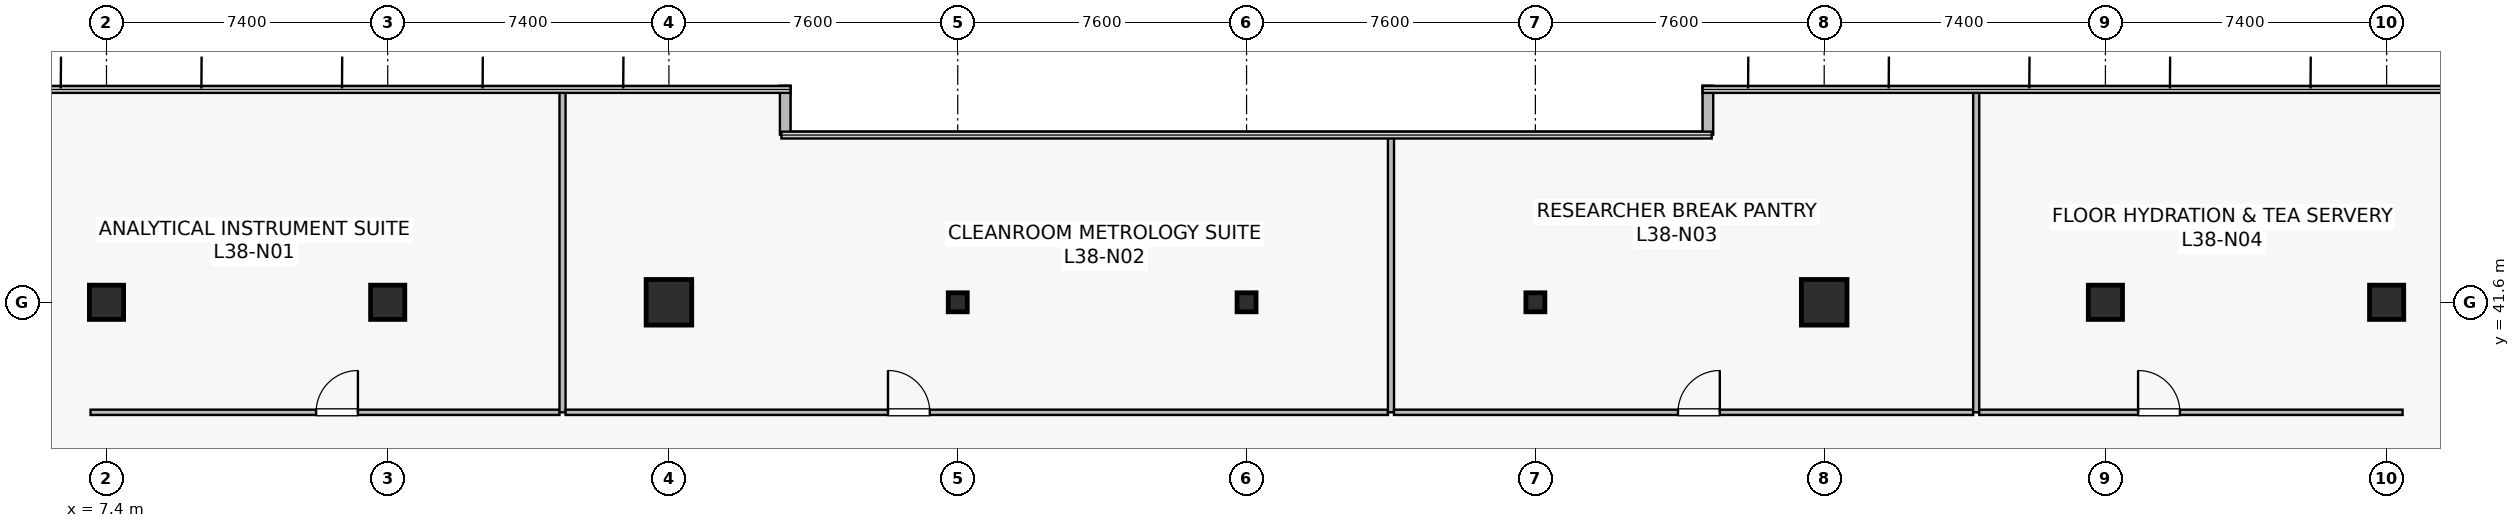
"""IFC4 building model, lengths in metres.
Left out: names, types, materials, properties, quantities, classifications, styles, units other than length and angle.
Written with IfcOpenShell. Run it as: python <this file> out.ifc"""

import sys

from ifc_helpers import new_model, si_unit, direction, frame, frame_2d, origin, origin_2d, place, context, subcontext, project, spatial, rectangle, hollow_rectangle, extrude, source, transform, mapped, element, fill, save


model = new_model("IFC4")
c1 = context("Model", 3, precision=1e-05, world=origin(), true_north=direction((0.0, 1.0)))
c2 = subcontext(c1, "Body", "Model", "MODEL_VIEW")
j1 = project(units=[si_unit("LENGTHUNIT", "METRE"), si_unit("PLANEANGLEUNIT", "RADIAN")], contexts=[c1])
p1 = place(None, origin())
s1 = spatial("IfcSite", under=j1, at=p1, CompositionType="ELEMENT")
p2 = place(p1, origin())
s2 = spatial("IfcBuilding", under=s1, at=p2, CompositionType="ELEMENT")
p3 = place(p2, frame((0.0, 0.0, 158.4)))
s3 = spatial("IfcBuildingStorey", under=s2, at=p3, CompositionType="ELEMENT", Elevation=158.4)
m1 = source(origin(), c2, "Body", "SweptSolid", [
    extrude(rectangle(XDim=0.9, YDim=0.9, at=origin_2d()), origin(), (0.0, 0.0, 1.0), 4.1),
])
p4 = place(p3, frame((14.8, 41.6, 0.0), z_axis=(0.0, 0.0, 1.0), x_axis=(1.0, 0.0, 0.0)))
e1 = element("IfcColumn", 1, at=p4, inside=s3, PredefinedType="COLUMN", context=c2, shape_type="MappedRepresentation", body=[
    mapped(m1, transform((0.0, 0.0, 0.0), scale=1.0)),
])
m2 = source(origin(), c2, "Body", "SweptSolid", [
    extrude(rectangle(XDim=1.2, YDim=1.2, at=origin_2d()), origin(), (0.0, 0.0, 1.0), 4.1),
])
for number, where, z_axis, x_axis in (
    (2, (22.2, 41.6, 0.0), (0.0, 0.0, 1.0), (1.0, 0.0, 0.0)),
    (3, (52.6, 41.6, 0.0), (0.0, 0.0, 1.0), (1.0, 0.0, 0.0)),
):
    element("IfcColumn", number, at=place(p3, frame(where, z_axis=z_axis, x_axis=x_axis)), inside=s3, PredefinedType="COLUMN", context=c2, shape_type="MappedRepresentation", body=[
        mapped(m2, transform((0.0, 0.0, 0.0), scale=1.0)),
    ])
for number, where, z_axis, x_axis in (
    (4, (60.0, 41.6, 0.0), (0.0, 0.0, 1.0), (1.0, 0.0, 0.0)),
    (5, (7.4, 41.6, 0.0), (0.0, 0.0, 1.0), (1.0, 0.0, 0.0)),
    (6, (67.4, 41.6, 0.0), (0.0, 0.0, 1.0), (1.0, 0.0, 0.0)),
):
    element("IfcColumn", number, at=place(p3, frame(where, z_axis=z_axis, x_axis=x_axis)), inside=s3, PredefinedType="COLUMN", context=c2, shape_type="MappedRepresentation", body=[
        mapped(m1, transform((0.0, 0.0, 0.0), scale=1.0)),
    ])
m3 = source(origin(), c2, "Body", "SweptSolid", [
    extrude(hollow_rectangle(XDim=0.5, YDim=0.5, WallThickness=0.022, at=origin_2d()), origin(), (0.0, 0.0, 1.0), 4.1),
])
for number, where, z_axis, x_axis in (
    (7, (29.8, 41.6, 0.0), (0.0, 0.0, 1.0), (1.0, 0.0, 0.0)),
    (8, (37.4, 41.6, 0.0), (0.0, 0.0, 1.0), (1.0, 0.0, 0.0)),
    (9, (45.0, 41.6, 0.0), (0.0, 0.0, 1.0), (1.0, 0.0, 0.0)),
):
    element("IfcColumn", number, at=place(p3, frame(where, z_axis=z_axis, x_axis=x_axis)), inside=s3, PredefinedType="COLUMN", context=c2, shape_type="MappedRepresentation", body=[
        mapped(m3, transform((0.0, 0.0, 0.0), scale=1.0)),
    ])
for number, where, z_axis, x_axis in (
    (10, (49.54, 47.3, 0.0), (0.0, 0.0, 1.0), (0.0, -1.0, 0.0)),
    (11, (25.26, 46.012, 0.0), (0.0, 0.0, 1.0), (0.0, 1.0, 0.0)),
):
    element("IfcWall", number, at=place(p3, frame(where, z_axis=z_axis, x_axis=x_axis)), inside=s3, PredefinedType="STANDARD", context=c2, shape_type="SweptSolid", body=[
        extrude(rectangle(XDim=1.288, YDim=0.28, at=frame_2d((0.644, 0.0))), origin(), (0.0, 0.0, 1.0), 3.79),
    ])
p5 = place(p3, frame((6.98, 38.705, 0.0), z_axis=(0.0, 0.0, 1.0), x_axis=(1.0, 0.0, 0.0)))
e12 = element("IfcWall", 12, at=p5, inside=s3, PredefinedType="PARTITIONING", context=c2, shape_type="SweptSolid", body=[
    extrude(rectangle(XDim=12.34, YDim=0.14, at=frame_2d((6.17, 0.0))), origin(), (0.0, 0.0, 1.0), 3.187),
])
p6 = place(p5, frame((5.936, 0.0, 0.0)))
e13 = element("IfcOpeningElement", 13, at=p6, cuts=e12, PredefinedType="OPENING", context=c2, shape_type="SweptSolid", body=[
    extrude(rectangle(XDim=1.1, YDim=2.18, at=frame_2d((0.55, 1.09))), frame((0.0, 0.08, 0.0), z_axis=(0.0, -1.0, 0.0), x_axis=(1.0, 0.0, 0.0)), (0.0, 0.0, 1.0), 0.16),
])
p7 = place(p3, frame((19.4, 38.705, 0.0), z_axis=(0.0, 0.0, 1.0), x_axis=(0.0, 1.0, 0.0)))
e14 = element("IfcWall", 14, at=p7, inside=s3, PredefinedType="PARTITIONING", context=c2, shape_type="SweptSolid", body=[
    extrude(rectangle(XDim=8.485, YDim=0.16, at=frame_2d((4.242, 0.0))), origin(), (0.0, 0.0, 1.0), 3.075),
])
p8 = place(p3, frame((19.48, 38.705, 0.0), z_axis=(0.0, 0.0, 1.0), x_axis=(1.0, 0.0, 0.0)))
e15 = element("IfcWall", 15, at=p8, inside=s3, PredefinedType="PARTITIONING", context=c2, shape_type="SweptSolid", body=[
    extrude(rectangle(XDim=21.64, YDim=0.14, at=frame_2d((10.82, 0.0))), origin(), (0.0, 0.0, 1.0), 3.187),
])
p9 = place(p8, frame((8.484, 0.0, 0.0)))
e16 = element("IfcOpeningElement", 16, at=p9, cuts=e15, PredefinedType="OPENING", context=c2, shape_type="SweptSolid", body=[
    extrude(rectangle(XDim=1.1, YDim=2.18, at=frame_2d((0.55, 1.09))), frame((0.0, 0.08, 0.0), z_axis=(0.0, -1.0, 0.0), x_axis=(1.0, 0.0, 0.0)), (0.0, 0.0, 1.0), 0.16),
])
p10 = place(p3, frame((41.2, 38.705, 0.0), z_axis=(0.0, 0.0, 1.0), x_axis=(0.0, 1.0, 0.0)))
e17 = element("IfcWall", 17, at=p10, inside=s3, PredefinedType="PARTITIONING", context=c2, shape_type="SweptSolid", body=[
    extrude(rectangle(XDim=7.285, YDim=0.16, at=frame_2d((3.643, 0.0))), origin(), (0.0, 0.0, 1.0), 3.075),
])
p11 = place(p3, frame((41.28, 38.705, 0.0), z_axis=(0.0, 0.0, 1.0), x_axis=(1.0, 0.0, 0.0)))
e18 = element("IfcWall", 18, at=p11, inside=s3, PredefinedType="PARTITIONING", context=c2, shape_type="SweptSolid", body=[
    extrude(rectangle(XDim=15.24, YDim=0.14, at=frame_2d((7.62, 0.0))), origin(), (0.0, 0.0, 1.0), 3.187),
])
p12 = place(p11, frame((7.473, 0.0, 0.0)))
e19 = element("IfcOpeningElement", 19, at=p12, cuts=e18, PredefinedType="OPENING", context=c2, shape_type="SweptSolid", body=[
    extrude(rectangle(XDim=1.1, YDim=2.18, at=frame_2d((0.55, 1.09))), frame((0.0, 0.08, 0.0), z_axis=(0.0, -1.0, 0.0), x_axis=(1.0, 0.0, 0.0)), (0.0, 0.0, 1.0), 0.16),
])
p13 = place(p3, frame((56.6, 38.705, 0.0), z_axis=(0.0, 0.0, 1.0), x_axis=(0.0, 1.0, 0.0)))
e20 = element("IfcWall", 20, at=p13, inside=s3, PredefinedType="PARTITIONING", context=c2, shape_type="SweptSolid", body=[
    extrude(rectangle(XDim=8.485, YDim=0.16, at=frame_2d((4.242, 0.0))), origin(), (0.0, 0.0, 1.0), 3.075),
])
p14 = place(p3, frame((56.68, 38.705, 0.0), z_axis=(0.0, 0.0, 1.0), x_axis=(1.0, 0.0, 0.0)))
e21 = element("IfcWall", 21, at=p14, inside=s3, PredefinedType="PARTITIONING", context=c2, shape_type="SweptSolid", body=[
    extrude(rectangle(XDim=11.14, YDim=0.14, at=frame_2d((5.57, 0.0))), origin(), (0.0, 0.0, 1.0), 3.187),
])
p15 = place(p14, frame((4.179, 0.0, 0.0)))
e22 = element("IfcOpeningElement", 22, at=p15, cuts=e21, PredefinedType="OPENING", context=c2, shape_type="SweptSolid", body=[
    extrude(rectangle(XDim=1.1, YDim=2.18, at=frame_2d((0.55, 1.09))), frame((0.0, 0.08, 0.0), z_axis=(0.0, -1.0, 0.0), x_axis=(1.0, 0.0, 0.0)), (0.0, 0.0, 1.0), 0.16),
])
m4 = source(origin(), c2, "Body", "SweptSolid", [
    extrude(rectangle(XDim=1.1, YDim=2.18, at=frame_2d((0.55, 1.09))), frame((0.0, 0.025, 0.0), z_axis=(0.0, -1.0, 0.0), x_axis=(1.0, 0.0, 0.0)), (0.0, 0.0, 1.0), 0.05),
])
p16 = place(p6, origin())
e23 = element("IfcDoor", 23, at=p16, inside=s3, OperationType="SINGLE_SWING_RIGHT", PredefinedType="DOOR", context=c2, shape_type="MappedRepresentation", body=[
    mapped(m4, transform((0.0, 0.0, 0.0), scale=1.0)),
])
fill(e13, e23)
p17 = place(p9, origin())
e24 = element("IfcDoor", 24, at=p17, inside=s3, OperationType="SINGLE_SWING_LEFT", PredefinedType="DOOR", context=c2, shape_type="MappedRepresentation", body=[
    mapped(m4, transform((0.0, 0.0, 0.0), scale=1.0)),
])
fill(e16, e24)
p18 = place(p12, origin())
e25 = element("IfcDoor", 25, at=p18, inside=s3, OperationType="SINGLE_SWING_RIGHT", PredefinedType="DOOR", context=c2, shape_type="MappedRepresentation", body=[
    mapped(m4, transform((0.0, 0.0, 0.0), scale=1.0)),
])
fill(e19, e25)
p19 = place(p15, origin())
e26 = element("IfcDoor", 26, at=p19, inside=s3, OperationType="SINGLE_SWING_LEFT", PredefinedType="DOOR", context=c2, shape_type="MappedRepresentation", body=[
    mapped(m4, transform((0.0, 0.0, 0.0), scale=1.0)),
])
fill(e22, e26)
save(model, sys.argv[1])
